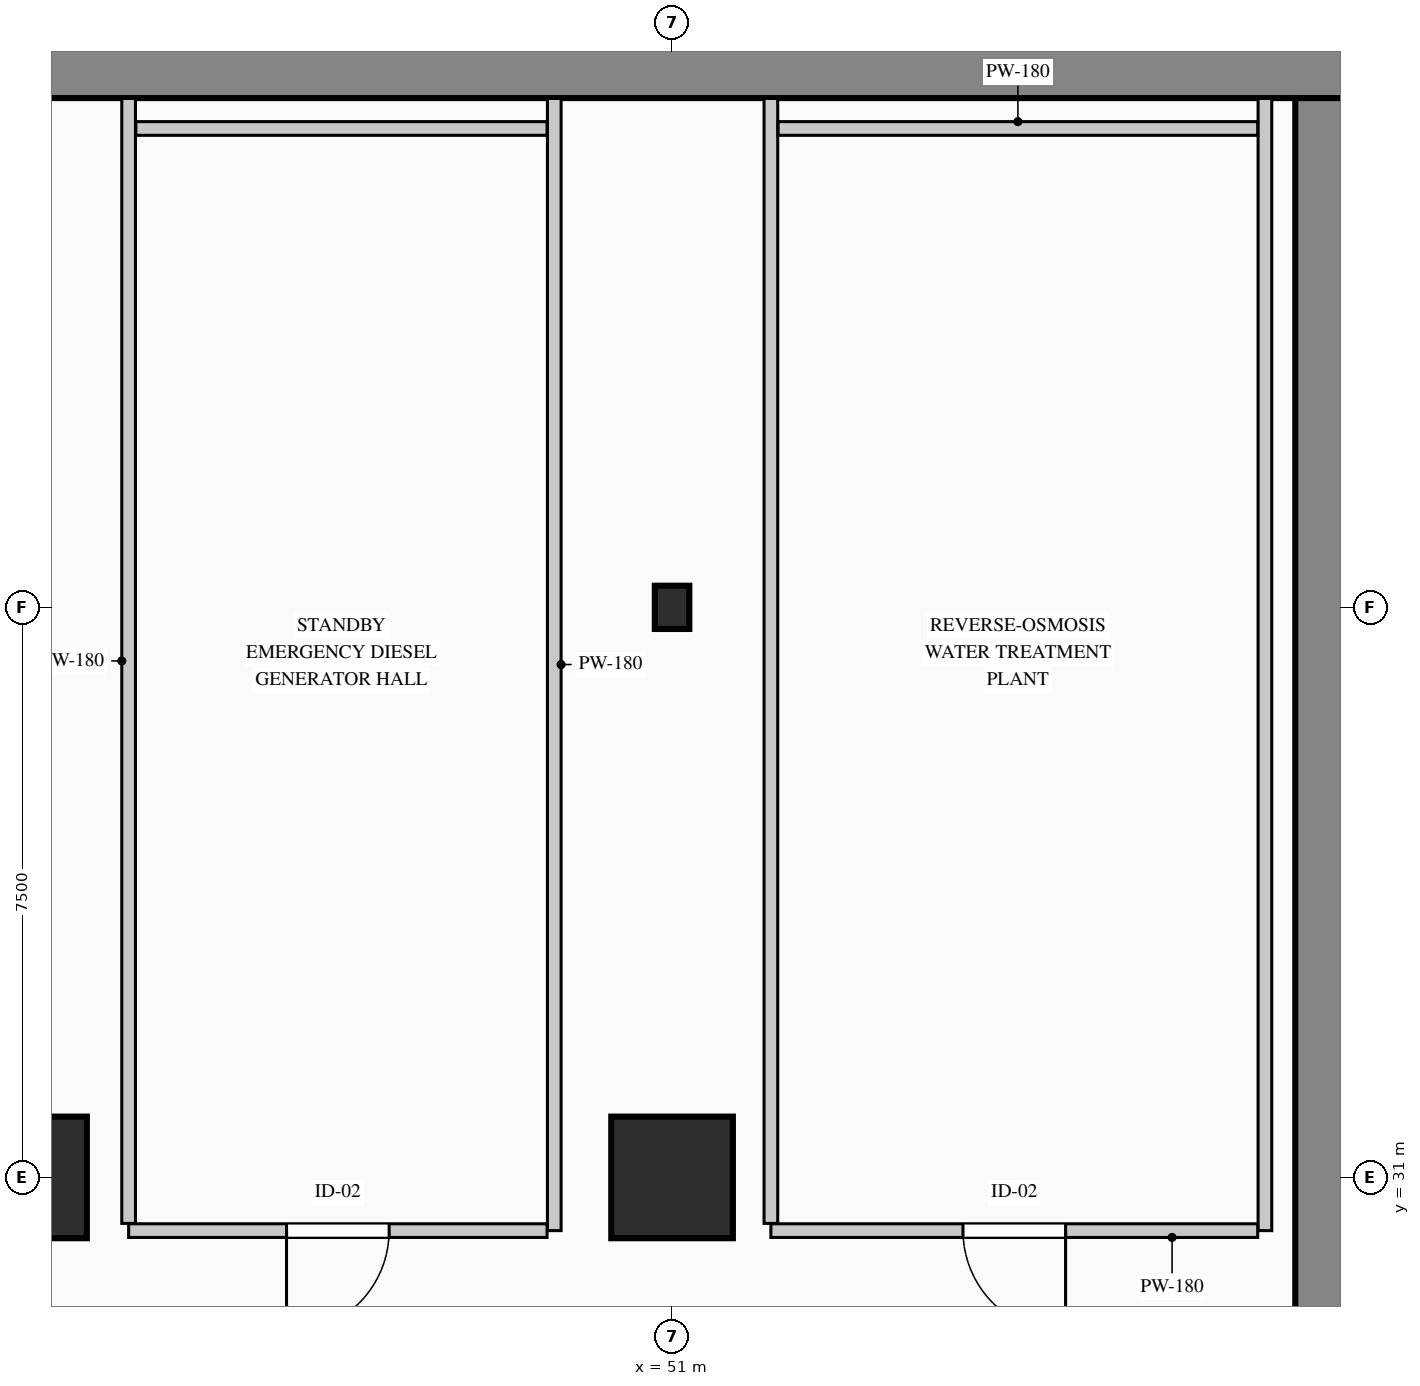
"""IFC4 building model, lengths in metres.
Left out: names, types, materials, properties, quantities, classifications, styles, units other than length and angle.
Written with IfcOpenShell. Run it as: python <this file> out.ifc"""

import sys

from ifc_helpers import new_model, si_unit, direction, frame, frame_2d, origin, origin_2d, place, context, subcontext, project, spatial, rectangle, i_section, extrude, element, fill, save


model = new_model("IFC4")
c1 = context("Model", 3, precision=1e-05, world=origin(), true_north=direction((0.0, 1.0)))
c2 = subcontext(c1, "Body", "Model", "MODEL_VIEW")
j1 = project(units=[si_unit("LENGTHUNIT", "METRE"), si_unit("PLANEANGLEUNIT", "RADIAN")], contexts=[c1])
p1 = place(None, origin())
s1 = spatial("IfcSite", under=j1, at=p1, CompositionType="ELEMENT")
p2 = place(p1, origin())
s2 = spatial("IfcBuilding", under=s1, at=p2, CompositionType="ELEMENT")
p3 = place(p2, frame((0.0, 0.0, -13.5)))
s3 = spatial("IfcBuildingStorey", under=s2, at=p3, CompositionType="ELEMENT", Elevation=-13.5)
p4 = place(p3, frame((0.0, 45.6, 0.0), z_axis=(0.0, 0.0, 1.0), x_axis=(1.0, 0.0, 0.0)))
e1 = element("IfcWall", 1, at=p4, inside=s3, PredefinedType="USERDEFINED", context=c2, shape_type="SweptSolid", body=[
    extrude(rectangle(XDim=60.0, YDim=0.8, at=frame_2d((30.0, 0.0))), origin(), (0.0, 0.0, 1.0), 4.5),
])
p5 = place(p3, frame((59.6, 0.8, 0.0), z_axis=(0.0, 0.0, 1.0), x_axis=(0.0, 1.0, 0.0)))
e2 = element("IfcWall", 2, at=p5, inside=s3, PredefinedType="USERDEFINED", context=c2, shape_type="SweptSolid", body=[
    extrude(rectangle(XDim=44.4, YDim=0.8, at=frame_2d((22.2, 0.0))), origin(), (0.0, 0.0, 1.0), 4.5),
])
for number, where, z_axis, x_axis in (
    (3, (42.5, 31.0, 0.0), (0.0, 0.0, 1.0), (1.0, 0.0, 0.0)),
    (4, (51.0, 31.0, 0.0), (0.0, 0.0, 1.0), (1.0, 0.0, 0.0)),
):
    element("IfcColumn", number, at=place(p3, frame(where, z_axis=z_axis, x_axis=x_axis)), inside=s3, PredefinedType="COLUMN", context=c2, shape_type="SweptSolid", body=[
        extrude(rectangle(XDim=1.6, YDim=1.6, at=origin_2d()), origin(), (0.0, 0.0, 1.0), 4.5),
    ])
p6 = place(p3, frame((51.0, 38.5, 0.0), z_axis=(0.0, 0.0, 1.0), x_axis=(1.0, 0.0, 0.0)))
e5 = element("IfcColumn", 5, at=p6, inside=s3, PredefinedType="COLUMN", context=c2, shape_type="SweptSolid", body=[
    extrude(i_section(OverallWidth=0.454, OverallDepth=0.569, WebThickness=0.078, FlangeThickness=0.08, FilletRadius=0.015, at=origin_2d()), origin(), (0.0, 0.0, 1.0), 4.5),
])
p7 = place(p3, frame((58.8, 45.195, 0.0), z_axis=(0.0, 0.0, 1.0), x_axis=(0.0, -1.0, 0.0)))
e6 = element("IfcWall", 6, at=p7, inside=s3, PredefinedType="PARTITIONING", context=c2, shape_type="SweptSolid", body=[
    extrude(rectangle(XDim=14.895, YDim=0.18, at=frame_2d((7.448, 0.0))), origin(), (0.0, 0.0, 1.0), 4.15),
])
p8 = place(p3, frame((58.705, 30.3, 0.0), z_axis=(0.0, 0.0, 1.0), x_axis=(-1.0, 0.0, 0.0)))
e7 = element("IfcWall", 7, at=p8, inside=s3, PredefinedType="PARTITIONING", context=c2, shape_type="SweptSolid", body=[
    extrude(rectangle(XDim=6.405, YDim=0.18, at=frame_2d((3.203, 0.0))), origin(), (0.0, 0.0, 1.0), 3.635),
])
p9 = place(p8, frame((2.528, 0.0, 0.0)))
e8 = element("IfcOpeningElement", 8, at=p9, cuts=e7, PredefinedType="OPENING", context=c2, shape_type="SweptSolid", body=[
    extrude(rectangle(XDim=1.35, YDim=2.2, at=frame_2d((0.675, 1.1))), frame((0.0, 0.1, 0.0), z_axis=(0.0, -1.0, 0.0), x_axis=(1.0, 0.0, 0.0)), (0.0, 0.0, 1.0), 0.2),
])
p10 = place(p3, frame((52.3, 30.395, 0.0), z_axis=(0.0, 0.0, 1.0), x_axis=(0.0, 1.0, 0.0)))
e9 = element("IfcWall", 9, at=p10, inside=s3, PredefinedType="PARTITIONING", context=c2, shape_type="SweptSolid", body=[
    extrude(rectangle(XDim=14.8, YDim=0.18, at=frame_2d((7.4, 0.0))), origin(), (0.0, 0.0, 1.0), 4.15),
])
p11 = place(p3, frame((52.395, 44.8, 0.0), z_axis=(0.0, 0.0, 1.0), x_axis=(1.0, 0.0, 0.0)))
e10 = element("IfcWall", 10, at=p11, inside=s3, PredefinedType="PARTITIONING", context=c2, shape_type="SweptSolid", body=[
    extrude(rectangle(XDim=6.31, YDim=0.18, at=frame_2d((3.155, 0.0))), origin(), (0.0, 0.0, 1.0), 4.15),
])
p12 = place(p3, frame((49.45, 45.195, 0.0), z_axis=(0.0, 0.0, 1.0), x_axis=(0.0, -1.0, 0.0)))
e11 = element("IfcWall", 11, at=p12, inside=s3, PredefinedType="PARTITIONING", context=c2, shape_type="SweptSolid", body=[
    extrude(rectangle(XDim=14.895, YDim=0.18, at=frame_2d((7.448, 0.0))), origin(), (0.0, 0.0, 1.0), 3.635),
])
p13 = place(p3, frame((49.355, 30.3, 0.0), z_axis=(0.0, 0.0, 1.0), x_axis=(-1.0, 0.0, 0.0)))
e12 = element("IfcWall", 12, at=p13, inside=s3, PredefinedType="PARTITIONING", context=c2, shape_type="SweptSolid", body=[
    extrude(rectangle(XDim=5.505, YDim=0.18, at=frame_2d((2.752, 0.0))), origin(), (0.0, 0.0, 1.0), 4.15),
])
p14 = place(p13, frame((2.077, 0.0, 0.0)))
e13 = element("IfcOpeningElement", 13, at=p14, cuts=e12, PredefinedType="OPENING", context=c2, shape_type="SweptSolid", body=[
    extrude(rectangle(XDim=1.35, YDim=2.2, at=frame_2d((0.675, 1.1))), frame((0.0, 0.1, 0.0), z_axis=(0.0, -1.0, 0.0), x_axis=(1.0, 0.0, 0.0)), (0.0, 0.0, 1.0), 0.2),
])
p15 = place(p3, frame((43.85, 30.395, 0.0), z_axis=(0.0, 0.0, 1.0), x_axis=(0.0, 1.0, 0.0)))
e14 = element("IfcWall", 14, at=p15, inside=s3, PredefinedType="PARTITIONING", context=c2, shape_type="SweptSolid", body=[
    extrude(rectangle(XDim=14.8, YDim=0.18, at=frame_2d((7.4, 0.0))), origin(), (0.0, 0.0, 1.0), 4.15),
])
p16 = place(p3, frame((43.945, 44.8, 0.0), z_axis=(0.0, 0.0, 1.0), x_axis=(1.0, 0.0, 0.0)))
e15 = element("IfcWall", 15, at=p16, inside=s3, PredefinedType="PARTITIONING", context=c2, shape_type="SweptSolid", body=[
    extrude(rectangle(XDim=5.41, YDim=0.18, at=frame_2d((2.705, 0.0))), origin(), (0.0, 0.0, 1.0), 4.15),
])
p17 = place(p9, origin())
e16 = element("IfcDoor", 16, at=p17, inside=s3, OperationType="SINGLE_SWING_LEFT", PredefinedType="DOOR", context=c2, shape_type="SweptSolid", body=[
    extrude(rectangle(XDim=1.35, YDim=2.2, at=frame_2d((0.675, 1.1))), frame((0.0, 0.025, 0.0), z_axis=(0.0, -1.0, 0.0), x_axis=(1.0, 0.0, 0.0)), (0.0, 0.0, 1.0), 0.05),
])
fill(e8, e16)
p18 = place(p14, origin())
e17 = element("IfcDoor", 17, at=p18, inside=s3, OperationType="SINGLE_SWING_RIGHT", PredefinedType="DOOR", context=c2, shape_type="SweptSolid", body=[
    extrude(rectangle(XDim=1.35, YDim=2.2, at=frame_2d((0.675, 1.1))), frame((0.0, 0.025, 0.0), z_axis=(0.0, -1.0, 0.0), x_axis=(1.0, 0.0, 0.0)), (0.0, 0.0, 1.0), 0.05),
])
fill(e13, e17)
save(model, sys.argv[1])
